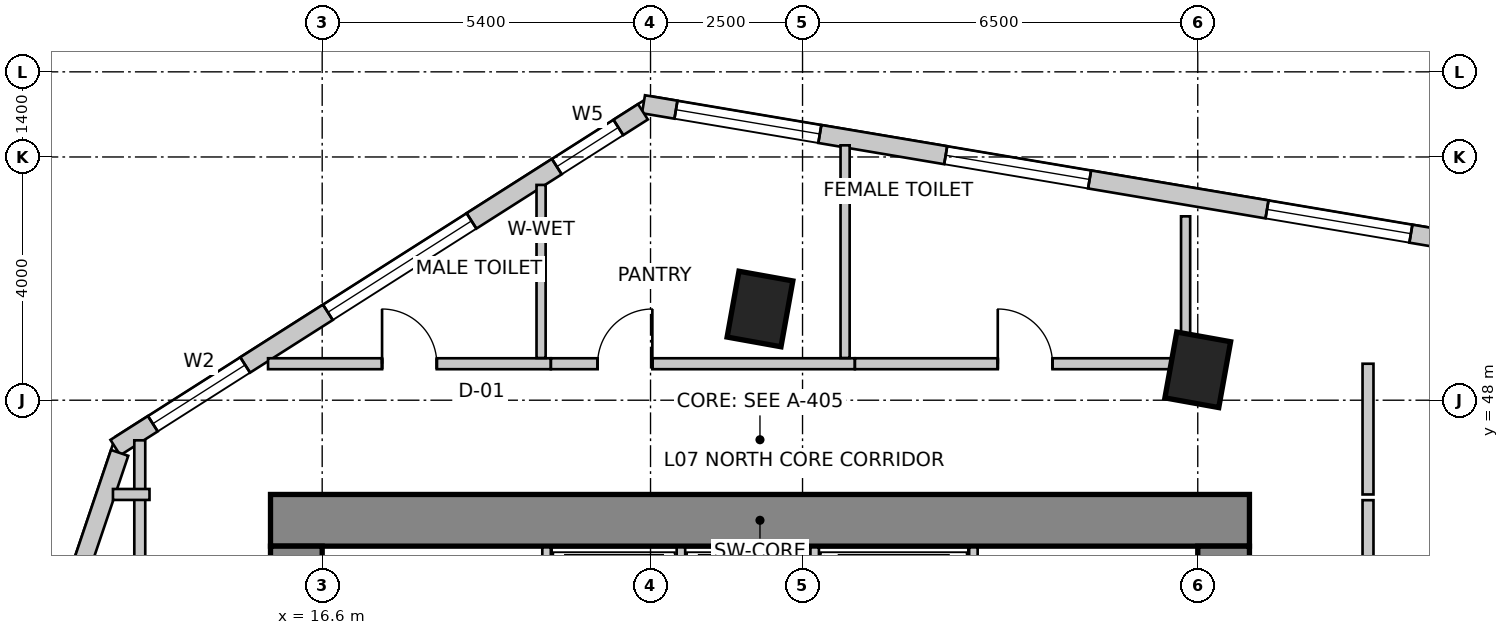
"""IFC4 building model, lengths in metres.
Left out: names, types, materials, properties, quantities, classifications, styles, units other than length and angle.
Written with IfcOpenShell. Run it as: python <this file> out.ifc"""

import sys

from ifc_helpers import new_model, si_unit, direction, frame, frame_2d, origin, origin_2d, place, context, subcontext, project, spatial, rectangle, extrude, source, transform, mapped, element, fill, save


model = new_model("IFC4")
c1 = context("Model", 3, precision=1e-05, world=origin(), true_north=direction((0.0, 1.0)))
c2 = subcontext(c1, "Body", "Model", "MODEL_VIEW")
j1 = project(units=[si_unit("LENGTHUNIT", "METRE"), si_unit("PLANEANGLEUNIT", "RADIAN")], contexts=[c1])
p1 = place(None, origin())
s1 = spatial("IfcSite", under=j1, at=p1, CompositionType="ELEMENT")
p2 = place(p1, origin())
s2 = spatial("IfcBuilding", under=s1, at=p2, CompositionType="ELEMENT")
p3 = place(p2, frame((0.0, 0.0, 31.0)))
s3 = spatial("IfcBuildingStorey", under=s2, at=p3, CompositionType="ELEMENT", Elevation=31.0)
p4 = place(p3, frame((15.75, 46.025, 0.0), z_axis=(0.0, 0.0, 1.0), x_axis=(1.0, 0.0, 0.0)))
e1 = element("IfcWall", 1, at=p4, inside=s3, PredefinedType="SHEAR", context=c2, shape_type="SweptSolid", body=[
    extrude(rectangle(XDim=16.1, YDim=0.85, at=frame_2d((8.05, 0.0))), origin(), (0.0, 0.0, 1.0), 4.0),
])
p5 = place(p3, frame((16.175, 34.2, 0.0), z_axis=(0.0, 0.0, 1.0), x_axis=(0.0, 1.0, 0.0)))
e2 = element("IfcWall", 2, at=p5, inside=s3, PredefinedType="SHEAR", context=c2, shape_type="SweptSolid", body=[
    extrude(rectangle(XDim=11.4, YDim=0.85, at=frame_2d((5.7, 0.0))), origin(), (0.0, 0.0, 1.0), 4.0),
])
m1 = source(origin(), c2, "Body", "SweptSolid", [
    extrude(rectangle(XDim=1.1, YDim=2.15, at=frame_2d((0.55, 1.075))), frame((0.0, 0.435, 0.0), z_axis=(0.0, -1.0, 0.0), x_axis=(1.0, 0.0, 0.0)), (0.0, 0.0, 1.0), 0.87),
])
p6 = place(p5, frame((7.15, 0.0, 0.0)))
e3 = element("IfcOpeningElement", 3, at=p6, cuts=e2, PredefinedType="OPENING", context=c2, shape_type="MappedRepresentation", body=[
    mapped(m1, transform((0.0, 0.0, 0.0), scale=1.0)),
])
p7 = place(p3, frame((31.425, 34.2, 0.0), z_axis=(0.0, 0.0, 1.0), x_axis=(0.0, 1.0, 0.0)))
e4 = element("IfcWall", 4, at=p7, inside=s3, PredefinedType="SHEAR", context=c2, shape_type="SweptSolid", body=[
    extrude(rectangle(XDim=11.4, YDim=0.85, at=frame_2d((5.7, 0.0))), origin(), (0.0, 0.0, 1.0), 4.0),
])
p8 = place(p7, frame((7.35, 0.0, 0.0)))
e5 = element("IfcOpeningElement", 5, at=p8, cuts=e4, PredefinedType="OPENING", context=c2, shape_type="MappedRepresentation", body=[
    mapped(m1, transform((0.0, 0.0, 0.0), scale=1.0)),
])
m2 = source(origin(), c2, "Body", "SweptSolid", [
    extrude(rectangle(XDim=0.9, YDim=1.1, at=origin_2d()), origin(), (0.0, 0.0, 1.0), 4.0),
])
for number, where, z_axis, x_axis in (
    (6, (23.8, 49.5, 0.0), (0.0, 0.0, 1.0), (0.984, -0.177, 0.0)),
    (7, (31.0, 48.5, 0.0), (0.0, 0.0, 1.0), (0.984, -0.177, 0.0)),
):
    element("IfcColumn", number, at=place(p3, frame(where, z_axis=z_axis, x_axis=x_axis)), inside=s3, PredefinedType="COLUMN", context=c2, shape_type="MappedRepresentation", body=[
        mapped(m2, transform((0.0, 0.0, 0.0), scale=1.0)),
    ])
p9 = place(p3, frame((58.761, 46.648, 0.0), z_axis=(0.0, 0.0, 1.0), x_axis=(-0.98607502735, 0.166301053624, 0.0)))
e8 = element("IfcWall", 8, at=p9, inside=s3, PredefinedType="SOLIDWALL", context=c2, shape_type="SweptSolid", body=[
    extrude(rectangle(XDim=37.397, YDim=0.3, at=frame_2d((18.699, 0.0))), origin(), (0.0, 0.0, 1.0), 3.75),
])
m3 = source(origin(), c2, "Body", "SweptSolid", [
    extrude(rectangle(XDim=2.1, YDim=2.0, at=frame_2d((1.05, 1.0))), frame((0.0, 0.16, 0.0), z_axis=(0.0, -1.0, 0.0), x_axis=(1.0, 0.0, 0.0)), (0.0, 0.0, 1.0), 0.32),
])
p10 = place(p9, frame((0.525, 0.0, 0.85)))
e9 = element("IfcOpeningElement", 9, at=p10, cuts=e8, PredefinedType="OPENING", context=c2, shape_type="MappedRepresentation", body=[
    mapped(m3, transform((0.0, 0.0, 0.0), scale=1.0)),
])
m4 = source(origin(), c2, "Body", "SweptSolid", [
    extrude(rectangle(XDim=2.4, YDim=2.2, at=frame_2d((1.2, 1.1))), frame((0.0, 0.16, 0.0), z_axis=(0.0, -1.0, 0.0), x_axis=(1.0, 0.0, 0.0)), (0.0, 0.0, 1.0), 0.32),
])
p11 = place(p9, frame((4.74, 0.0, 0.85)))
e10 = element("IfcOpeningElement", 10, at=p11, cuts=e8, PredefinedType="OPENING", context=c2, shape_type="MappedRepresentation", body=[
    mapped(m4, transform((0.0, 0.0, 0.0), scale=1.0)),
])
m5 = source(origin(), c2, "Body", "SweptSolid", [
    extrude(rectangle(XDim=2.8, YDim=2.4, at=frame_2d((1.4, 1.2))), frame((0.0, 0.16, 0.0), z_axis=(0.0, -1.0, 0.0), x_axis=(1.0, 0.0, 0.0)), (0.0, 0.0, 1.0), 0.32),
])
p12 = place(p9, frame((9.881, 0.0, 0.85)))
e11 = element("IfcOpeningElement", 11, at=p12, cuts=e8, PredefinedType="OPENING", context=c2, shape_type="MappedRepresentation", body=[
    mapped(m5, transform((0.0, 0.0, 0.0), scale=1.0)),
])
p13 = place(p9, frame((15.473, 0.0, 0.85)))
e12 = element("IfcOpeningElement", 12, at=p13, cuts=e8, PredefinedType="OPENING", context=c2, shape_type="MappedRepresentation", body=[
    mapped(m4, transform((0.0, 0.0, 0.0), scale=1.0)),
])
p14 = place(p9, frame((19.836, 0.0, 0.85)))
e13 = element("IfcOpeningElement", 13, at=p14, cuts=e8, PredefinedType="OPENING", context=c2, shape_type="MappedRepresentation", body=[
    mapped(m5, transform((0.0, 0.0, 0.0), scale=1.0)),
])
p15 = place(p9, frame((24.598, 0.0, 0.85)))
e14 = element("IfcOpeningElement", 14, at=p15, cuts=e8, PredefinedType="OPENING", context=c2, shape_type="MappedRepresentation", body=[
    mapped(m4, transform((0.0, 0.0, 0.0), scale=1.0)),
])
p16 = place(p9, frame((29.957, 0.0, 0.85)))
e15 = element("IfcOpeningElement", 15, at=p16, cuts=e8, PredefinedType="OPENING", context=c2, shape_type="MappedRepresentation", body=[
    mapped(m4, transform((0.0, 0.0, 0.0), scale=1.0)),
])
p17 = place(p9, frame((34.456, 0.0, 0.85)))
e16 = element("IfcOpeningElement", 16, at=p17, cuts=e8, PredefinedType="OPENING", context=c2, shape_type="MappedRepresentation", body=[
    mapped(m4, transform((0.0, 0.0, 0.0), scale=1.0)),
])
p18 = place(p3, frame((21.875, 52.743, 0.0), z_axis=(0.0, 0.0, 1.0), x_axis=(-0.843647802826, -0.536896996441, 0.0)))
e17 = element("IfcWall", 17, at=p18, inside=s3, PredefinedType="SOLIDWALL", context=c2, shape_type="SweptSolid", body=[
    extrude(rectangle(XDim=10.284, YDim=0.3, at=frame_2d((5.142, 0.0))), origin(), (0.0, 0.0, 1.0), 3.75),
])
m6 = source(origin(), c2, "Body", "SweptSolid", [
    extrude(rectangle(XDim=1.2, YDim=1.6, at=frame_2d((0.6, 0.8))), frame((0.0, 0.16, 0.0), z_axis=(0.0, -1.0, 0.0), x_axis=(1.0, 0.0, 0.0)), (0.0, 0.0, 1.0), 0.32),
])
p19 = place(p18, frame((0.479, 0.0, 0.85)))
e18 = element("IfcOpeningElement", 18, at=p19, cuts=e17, PredefinedType="OPENING", context=c2, shape_type="MappedRepresentation", body=[
    mapped(m6, transform((0.0, 0.0, 0.0), scale=1.0)),
])
p20 = place(p18, frame((3.342, 0.0, 0.85)))
e19 = element("IfcOpeningElement", 19, at=p20, cuts=e17, PredefinedType="OPENING", context=c2, shape_type="MappedRepresentation", body=[
    mapped(m5, transform((0.0, 0.0, 0.0), scale=1.0)),
])
m7 = source(origin(), c2, "Body", "SweptSolid", [
    extrude(rectangle(XDim=1.8, YDim=2.1, at=frame_2d((0.9, 1.05))), frame((0.0, 0.16, 0.0), z_axis=(0.0, -1.0, 0.0), x_axis=(1.0, 0.0, 0.0)), (0.0, 0.0, 1.0), 0.32),
])
p21 = place(p18, frame((7.754, 0.0, 0.85)))
e20 = element("IfcOpeningElement", 20, at=p21, cuts=e17, PredefinedType="OPENING", context=c2, shape_type="MappedRepresentation", body=[
    mapped(m7, transform((0.0, 0.0, 0.0), scale=1.0)),
])
p22 = place(p3, frame((13.269, 47.134, 0.0), z_axis=(0.0, 0.0, 1.0), x_axis=(-0.319920423265, -0.947444416722, 0.0)))
e21 = element("IfcWall", 21, at=p22, inside=s3, PredefinedType="SOLIDWALL", context=c2, shape_type="SweptSolid", body=[
    extrude(rectangle(XDim=16.135, YDim=0.3, at=frame_2d((8.067, 0.0))), origin(), (0.0, 0.0, 1.0), 3.75),
])
p23 = place(p22, frame((2.188, 0.0, 0.85)))
e22 = element("IfcOpeningElement", 22, at=p23, cuts=e21, PredefinedType="OPENING", context=c2, shape_type="MappedRepresentation", body=[
    mapped(m4, transform((0.0, 0.0, 0.0), scale=1.0)),
])
p24 = place(p22, frame((6.959, 0.0, 0.85)))
e23 = element("IfcOpeningElement", 23, at=p24, cuts=e21, PredefinedType="OPENING", context=c2, shape_type="MappedRepresentation", body=[
    mapped(m5, transform((0.0, 0.0, 0.0), scale=1.0)),
])
p25 = place(p22, frame((12.13, 0.0, 0.85)))
e24 = element("IfcOpeningElement", 24, at=p25, cuts=e21, PredefinedType="OPENING", context=c2, shape_type="MappedRepresentation", body=[
    mapped(m4, transform((0.0, 0.0, 0.0), scale=1.0)),
])
for number, where, z_axis, x_axis in (
    (25, (20.29, 43.28, 0.0), (0.0, 0.0, 1.0), (0.0, 1.0, 0.0)),
    (26, (27.31, 43.28, 0.0), (0.0, 0.0, 1.0), (0.0, 1.0, 0.0)),
):
    element("IfcWall", number, at=place(p3, frame(where, z_axis=z_axis, x_axis=x_axis)), inside=s3, PredefinedType="SOLIDWALL", context=c2, shape_type="SweptSolid", body=[
        extrude(rectangle(XDim=2.3, YDim=0.14, at=frame_2d((1.15, 0.0))), origin(), (0.0, 0.0, 1.0), 3.75),
    ])
for number, where, z_axis, x_axis in (
    (27, (22.5, 43.02, 0.0), (0.0, 0.0, 1.0), (0.0, 1.0, 0.0)),
    (28, (24.7, 43.02, 0.0), (0.0, 0.0, 1.0), (0.0, 1.0, 0.0)),
):
    element("IfcWall", number, at=place(p3, frame(where, z_axis=z_axis, x_axis=x_axis)), inside=s3, PredefinedType="SOLIDWALL", context=c2, shape_type="SweptSolid", body=[
        extrude(rectangle(XDim=2.56, YDim=0.14, at=frame_2d((1.28, 0.0))), origin(), (0.0, 0.0, 1.0), 3.75),
    ])
p26 = place(p3, frame((13.6, 33.444, 0.0), z_axis=(0.0, 0.0, 1.0), x_axis=(0.0, 1.0, 0.0)))
e29 = element("IfcWall", 29, at=p26, inside=s3, PredefinedType="PARTITIONING", context=c2, shape_type="SweptSolid", body=[
    extrude(rectangle(XDim=13.896, YDim=0.18, at=frame_2d((6.948, 0.0))), origin(), (0.0, 0.0, 1.0), 2.892),
])
m8 = source(origin(), c2, "Body", "SweptSolid", [
    extrude(rectangle(XDim=0.9, YDim=2.15, at=frame_2d((0.45, 1.075))), frame((0.0, 0.1, 0.0), z_axis=(0.0, -1.0, 0.0), x_axis=(1.0, 0.0, 0.0)), (0.0, 0.0, 1.0), 0.2),
])
p27 = place(p26, frame((4.144, 0.0, 0.0)))
e30 = element("IfcOpeningElement", 30, at=p27, cuts=e29, PredefinedType="OPENING", context=c2, shape_type="MappedRepresentation", body=[
    mapped(m8, transform((0.0, 0.0, 0.0), scale=1.0)),
])
p28 = place(p3, frame((13.76, 46.45, 0.0), z_axis=(0.0, 0.0, 1.0), x_axis=(-1.0, 0.0, 0.0)))
e31 = element("IfcWall", 31, at=p28, inside=s3, PredefinedType="PARTITIONING", context=c2, shape_type="SweptSolid", body=[
    extrude(rectangle(XDim=0.601, YDim=0.18, at=frame_2d((0.301, 0.0))), origin(), (0.0, 0.0, 1.0), 3.75),
])
p29 = place(p3, frame((15.71, 48.6, 0.0), z_axis=(0.0, 0.0, 1.0), x_axis=(1.0, 0.0, 0.0)))
e32 = element("IfcWall", 32, at=p29, inside=s3, PredefinedType="PARTITIONING", context=c2, shape_type="SweptSolid", body=[
    extrude(rectangle(XDim=4.65, YDim=0.18, at=frame_2d((2.325, 0.0))), origin(), (0.0, 0.0, 1.0), 3.75),
])
p30 = place(p29, frame((1.875, 0.0, 0.0)))
e33 = element("IfcOpeningElement", 33, at=p30, cuts=e32, PredefinedType="OPENING", context=c2, shape_type="MappedRepresentation", body=[
    mapped(m8, transform((0.0, 0.0, 0.0), scale=1.0)),
])
p31 = place(p3, frame((20.362, 48.6, 0.0), z_axis=(0.0, 0.0, 1.0), x_axis=(1.0, 0.0, 0.0)))
e34 = element("IfcWall", 34, at=p31, inside=s3, PredefinedType="PARTITIONING", context=c2, shape_type="SweptSolid", body=[
    extrude(rectangle(XDim=4.998, YDim=0.18, at=frame_2d((2.499, 0.0))), origin(), (0.0, 0.0, 1.0), 3.419),
])
p32 = place(p31, frame((0.768, 0.0, 0.0)))
e35 = element("IfcOpeningElement", 35, at=p32, cuts=e34, PredefinedType="OPENING", context=c2, shape_type="MappedRepresentation", body=[
    mapped(m8, transform((0.0, 0.0, 0.0), scale=1.0)),
])
p33 = place(p3, frame((25.362, 48.6, 0.0), z_axis=(0.0, 0.0, 1.0), x_axis=(1.0, 0.0, 0.0)))
e36 = element("IfcWall", 36, at=p33, inside=s3, PredefinedType="PARTITIONING", context=c2, shape_type="SweptSolid", body=[
    extrude(rectangle(XDim=5.598, YDim=0.18, at=frame_2d((2.799, 0.0))), origin(), (0.0, 0.0, 1.0), 2.892),
])
p34 = place(p33, frame((2.349, 0.0, 0.0)))
e37 = element("IfcOpeningElement", 37, at=p34, cuts=e36, PredefinedType="OPENING", context=c2, shape_type="MappedRepresentation", body=[
    mapped(m8, transform((0.0, 0.0, 0.0), scale=1.0)),
])
p35 = place(p3, frame((33.8, 48.6, 0.0), z_axis=(0.0, 0.0, 1.0), x_axis=(0.0, -1.0, 0.0)))
e38 = element("IfcWall", 38, at=p35, inside=s3, PredefinedType="PARTITIONING", context=c2, shape_type="SweptSolid", body=[
    extrude(rectangle(XDim=2.15, YDim=0.18, at=frame_2d((1.075, 0.0))), origin(), (0.0, 0.0, 1.0), 2.892),
])
p36 = place(p3, frame((33.8, 46.356, 0.0), z_axis=(0.0, 0.0, 1.0), x_axis=(0.0, -1.0, 0.0)))
e39 = element("IfcWall", 39, at=p36, inside=s3, PredefinedType="PARTITIONING", context=c2, shape_type="SweptSolid", body=[
    extrude(rectangle(XDim=8.516, YDim=0.18, at=frame_2d((4.258, 0.0))), origin(), (0.0, 0.0, 1.0), 3.279),
])
p37 = place(p3, frame((20.2, 51.54, 0.0), z_axis=(0.0, 0.0, 1.0), x_axis=(0.0, -1.0, 0.0)))
e40 = element("IfcWall", 40, at=p37, inside=s3, PredefinedType="PARTITIONING", context=c2, shape_type="SweptSolid", body=[
    extrude(rectangle(XDim=2.846, YDim=0.15, at=frame_2d((1.423, 0.0))), origin(), (0.0, 0.0, 1.0), 3.75),
])
p38 = place(p3, frame((25.2, 52.192, 0.0), z_axis=(0.0, 0.0, 1.0), x_axis=(0.0, -1.0, 0.0)))
e41 = element("IfcWall", 41, at=p38, inside=s3, PredefinedType="PARTITIONING", context=c2, shape_type="SweptSolid", body=[
    extrude(rectangle(XDim=3.498, YDim=0.15, at=frame_2d((1.749, 0.0))), origin(), (0.0, 0.0, 1.0), 2.892),
])
p39 = place(p3, frame((30.8, 51.024, 0.0), z_axis=(0.0, 0.0, 1.0), x_axis=(0.0, -1.0, 0.0)))
e42 = element("IfcWall", 42, at=p39, inside=s3, PredefinedType="PARTITIONING", context=c2, shape_type="SweptSolid", body=[
    extrude(rectangle(XDim=2.204, YDim=0.15, at=frame_2d((1.102, 0.0))), origin(), (0.0, 0.0, 1.0), 3.75),
])
m9 = source(origin(), c2, "Body", "SweptSolid", [
    extrude(rectangle(XDim=2.4, YDim=2.2, at=frame_2d((1.2, 1.1))), frame((0.0, -0.015, 0.0), z_axis=(0.0, -1.0, 0.0), x_axis=(1.0, 0.0, 0.0)), (0.0, 0.0, 1.0), 0.06),
])
p40 = place(p15, origin())
e43 = element("IfcWindow", 43, at=p40, inside=s3, PartitioningType="SINGLE_PANEL", PredefinedType="WINDOW", context=c2, shape_type="MappedRepresentation", body=[
    mapped(m9, transform((0.0, 0.0, 0.0), scale=1.0)),
])
fill(e14, e43)
p41 = place(p16, origin())
e44 = element("IfcWindow", 44, at=p41, inside=s3, PartitioningType="SINGLE_PANEL", PredefinedType="WINDOW", context=c2, shape_type="MappedRepresentation", body=[
    mapped(m9, transform((0.0, 0.0, 0.0), scale=1.0)),
])
fill(e15, e44)
p42 = place(p17, origin())
e45 = element("IfcWindow", 45, at=p42, inside=s3, PartitioningType="SINGLE_PANEL", PredefinedType="WINDOW", context=c2, shape_type="MappedRepresentation", body=[
    mapped(m9, transform((0.0, 0.0, 0.0), scale=1.0)),
])
fill(e16, e45)
m10 = source(origin(), c2, "Body", "SweptSolid", [
    extrude(rectangle(XDim=1.2, YDim=1.6, at=frame_2d((0.6, 0.8))), frame((0.0, -0.015, 0.0), z_axis=(0.0, -1.0, 0.0), x_axis=(1.0, 0.0, 0.0)), (0.0, 0.0, 1.0), 0.06),
])
p43 = place(p19, origin())
e46 = element("IfcWindow", 46, at=p43, inside=s3, PartitioningType="SINGLE_PANEL", PredefinedType="WINDOW", context=c2, shape_type="MappedRepresentation", body=[
    mapped(m10, transform((0.0, 0.0, 0.0), scale=1.0)),
])
fill(e18, e46)
m11 = source(origin(), c2, "Body", "SweptSolid", [
    extrude(rectangle(XDim=2.8, YDim=2.4, at=frame_2d((1.4, 1.2))), frame((0.0, -0.015, 0.0), z_axis=(0.0, -1.0, 0.0), x_axis=(1.0, 0.0, 0.0)), (0.0, 0.0, 1.0), 0.06),
])
p44 = place(p20, origin())
e47 = element("IfcWindow", 47, at=p44, inside=s3, PartitioningType="SINGLE_PANEL", PredefinedType="WINDOW", context=c2, shape_type="MappedRepresentation", body=[
    mapped(m11, transform((0.0, 0.0, 0.0), scale=1.0)),
])
fill(e19, e47)
m12 = source(origin(), c2, "Body", "SweptSolid", [
    extrude(rectangle(XDim=1.8, YDim=2.1, at=frame_2d((0.9, 1.05))), frame((0.0, -0.015, 0.0), z_axis=(0.0, -1.0, 0.0), x_axis=(1.0, 0.0, 0.0)), (0.0, 0.0, 1.0), 0.06),
])
p45 = place(p21, origin())
e48 = element("IfcWindow", 48, at=p45, inside=s3, PartitioningType="SINGLE_PANEL", PredefinedType="WINDOW", context=c2, shape_type="MappedRepresentation", body=[
    mapped(m12, transform((0.0, 0.0, 0.0), scale=1.0)),
])
fill(e20, e48)
m13 = source(origin(), c2, "Body", "SweptSolid", [
    extrude(rectangle(XDim=0.9, YDim=2.15, at=frame_2d((0.45, 1.075))), frame((0.0, 0.025, 0.0), z_axis=(0.0, -1.0, 0.0), x_axis=(1.0, 0.0, 0.0)), (0.0, 0.0, 1.0), 0.05),
])
p46 = place(p30, origin())
e49 = element("IfcDoor", 49, at=p46, inside=s3, OperationType="SINGLE_SWING_LEFT", PredefinedType="DOOR", context=c2, shape_type="MappedRepresentation", body=[
    mapped(m13, transform((0.0, 0.0, 0.0), scale=1.0)),
])
fill(e33, e49)
p47 = place(p32, origin())
e50 = element("IfcDoor", 50, at=p47, inside=s3, OperationType="SINGLE_SWING_RIGHT", PredefinedType="DOOR", context=c2, shape_type="MappedRepresentation", body=[
    mapped(m13, transform((0.0, 0.0, 0.0), scale=1.0)),
])
fill(e35, e50)
p48 = place(p34, origin())
e51 = element("IfcDoor", 51, at=p48, inside=s3, OperationType="SINGLE_SWING_LEFT", PredefinedType="DOOR", context=c2, shape_type="MappedRepresentation", body=[
    mapped(m13, transform((0.0, 0.0, 0.0), scale=1.0)),
])
fill(e37, e51)
save(model, sys.argv[1])
